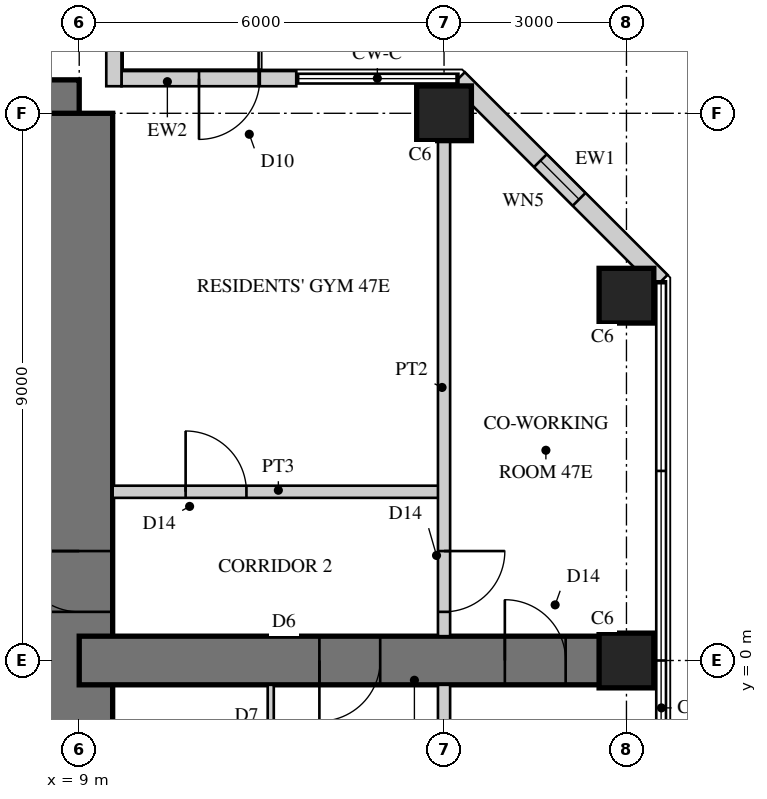
"""IFC4 building model, lengths in metres.
Left out: names, types, materials, properties, quantities, classifications, styles, units other than length and angle.
Written with IfcOpenShell. Run it as: python <this file> out.ifc"""

import sys

from ifc_helpers import new_model, si_unit, direction, frame, frame_2d, origin, origin_2d, place, context, subcontext, project, spatial, rectangle, hollow_rectangle, extrude, element, fill, save


model = new_model("IFC4")
c1 = context("Model", 3, precision=1e-05, world=origin(), true_north=direction((0.0, 1.0)))
c2 = subcontext(c1, "Body", "Model", "MODEL_VIEW")
j1 = project(units=[si_unit("LENGTHUNIT", "METRE"), si_unit("PLANEANGLEUNIT", "RADIAN")], contexts=[c1])
p1 = place(None, origin())
s1 = spatial("IfcSite", under=j1, at=p1, CompositionType="ELEMENT")
p2 = place(p1, origin())
s2 = spatial("IfcBuilding", under=s1, at=p2, CompositionType="ELEMENT")
p3 = place(p2, frame((0.0, 0.0, 189.9)))
s3 = spatial("IfcBuildingStorey", under=s2, at=p3, CompositionType="ELEMENT", Elevation=189.9)
p4 = place(p3, frame((9.0, 9.0, 0.0), z_axis=(0.0, 0.0, 1.0), x_axis=(-1.0, 0.0, 0.0)))
e1 = element("IfcWall", 1, at=p4, inside=s3, PredefinedType="SHEAR", context=c2, shape_type="SweptSolid", body=[
    extrude(rectangle(XDim=18.0, YDim=1.1, at=frame_2d((9.0, 0.0))), origin(), (0.0, 0.0, 1.0), 3.4),
])
p5 = place(p4, frame((9.8, 0.0, 0.0)))
e2 = element("IfcOpeningElement", 2, at=p5, cuts=e1, PredefinedType="OPENING", context=c2, shape_type="SweptSolid", body=[
    extrude(rectangle(XDim=1.0, YDim=2.4, at=frame_2d((0.5, 1.2))), frame((0.0, 0.56, 0.0), z_axis=(0.0, -1.0, 0.0), x_axis=(1.0, 0.0, 0.0)), (0.0, 0.0, 1.0), 1.12),
])
p6 = place(p3, frame((9.0, -9.0, 0.0), z_axis=(0.0, 0.0, 1.0), x_axis=(0.0, 1.0, 0.0)))
e3 = element("IfcWall", 3, at=p6, inside=s3, PredefinedType="SHEAR", context=c2, shape_type="SweptSolid", body=[
    extrude(rectangle(XDim=18.0, YDim=1.1, at=frame_2d((9.0, 0.0))), origin(), (0.0, 0.0, 1.0), 3.4),
])
p7 = place(p6, frame((9.8, 0.0, 0.0)))
e4 = element("IfcOpeningElement", 4, at=p7, cuts=e3, PredefinedType="OPENING", context=c2, shape_type="SweptSolid", body=[
    extrude(rectangle(XDim=1.0, YDim=2.4, at=frame_2d((0.5, 1.2))), frame((0.0, 0.56, 0.0), z_axis=(0.0, -1.0, 0.0), x_axis=(1.0, 0.0, 0.0)), (0.0, 0.0, 1.0), 1.12),
])
p8 = place(p3, frame((9.0, 0.0, 0.0), z_axis=(0.0, 0.0, 1.0), x_axis=(1.0, 0.0, 0.0)))
e5 = element("IfcWall", 5, at=p8, inside=s3, PredefinedType="SHEAR", context=c2, shape_type="SweptSolid", body=[
    extrude(rectangle(XDim=9.0, YDim=0.8, at=frame_2d((4.5, 0.0))), origin(), (0.0, 0.0, 1.0), 3.4),
])
p9 = place(p8, frame((3.95, 0.0, 0.0)))
e6 = element("IfcOpeningElement", 6, at=p9, cuts=e5, PredefinedType="OPENING", context=c2, shape_type="SweptSolid", body=[
    extrude(rectangle(XDim=1.0, YDim=2.15, at=frame_2d((0.5, 1.075))), frame((0.0, 0.41, 0.0), z_axis=(0.0, -1.0, 0.0), x_axis=(1.0, 0.0, 0.0)), (0.0, 0.0, 1.0), 0.82),
])
p10 = place(p8, frame((7.0, 0.0, 0.0)))
e7 = element("IfcOpeningElement", 7, at=p10, cuts=e5, PredefinedType="OPENING", context=c2, shape_type="SweptSolid", body=[
    extrude(rectangle(XDim=1.0, YDim=2.2, at=frame_2d((0.5, 1.1))), frame((0.0, 0.41, 0.0), z_axis=(0.0, -1.0, 0.0), x_axis=(1.0, 0.0, 0.0)), (0.0, 0.0, 1.0), 0.82),
])
for number, where, z_axis, x_axis in (
    (8, (15.0, 9.0, 0.0), (0.0, 0.0, 1.0), (1.0, 0.0, 0.0)),
    (9, (18.0, 0.0, 0.0), (0.0, 0.0, 1.0), (1.0, 0.0, 0.0)),
    (10, (18.0, 6.0, 0.0), (0.0, 0.0, 1.0), (1.0, 0.0, 0.0)),
):
    element("IfcColumn", number, at=place(p3, frame(where, z_axis=z_axis, x_axis=x_axis)), inside=s3, PredefinedType="COLUMN", context=c2, shape_type="SweptSolid", body=[
        extrude(rectangle(XDim=0.9, YDim=0.9, at=origin_2d()), origin(), (0.0, 0.0, 1.0), 3.4),
    ])
p11 = place(p3, frame((18.57, 6.236, 0.0), z_axis=(0.0, 0.0, 1.0), x_axis=(-0.707106781187, 0.707106781187, 0.0)))
e11 = element("IfcWall", 11, at=p11, inside=s3, PredefinedType="SOLIDWALL", context=c2, shape_type="SweptSolid", body=[
    extrude(rectangle(XDim=4.715, YDim=0.3, at=frame_2d((2.357, 0.0))), origin(), (0.0, 0.0, 1.0), 3.22),
])
p12 = place(p11, frame((1.907, 0.0, 0.3)))
e12 = element("IfcOpeningElement", 12, at=p12, cuts=e11, PredefinedType="OPENING", context=c2, shape_type="SweptSolid", body=[
    extrude(rectangle(XDim=0.9, YDim=2.4, at=frame_2d((0.45, 1.2))), frame((0.0, 0.16, 0.0), z_axis=(0.0, -1.0, 0.0), x_axis=(1.0, 0.0, 0.0)), (0.0, 0.0, 1.0), 0.32),
])
p13 = place(p3, frame((12.57, 9.57, 0.0), z_axis=(0.0, 0.0, 1.0), x_axis=(-1.0, 0.0, 0.0)))
e13 = element("IfcWall", 13, at=p13, inside=s3, PredefinedType="SOLIDWALL", context=c2, shape_type="SweptSolid", body=[
    extrude(rectangle(XDim=2.875, YDim=0.25, at=frame_2d((1.438, 0.0))), origin(), (0.0, 0.0, 1.0), 3.22),
])
p14 = place(p13, frame((0.6, 0.0, 0.0)))
e14 = element("IfcOpeningElement", 14, at=p14, cuts=e13, PredefinedType="OPENING", context=c2, shape_type="SweptSolid", body=[
    extrude(rectangle(XDim=1.0, YDim=2.2, at=frame_2d((0.5, 1.1))), frame((0.0, 0.135, 0.0), z_axis=(0.0, -1.0, 0.0), x_axis=(1.0, 0.0, 0.0)), (0.0, 0.0, 1.0), 0.27),
])
p15 = place(p3, frame((9.57, 9.445, 0.0), z_axis=(0.0, 0.0, 1.0), x_axis=(0.0, 1.0, 0.0)))
e15 = element("IfcWall", 15, at=p15, inside=s3, PredefinedType="SOLIDWALL", context=c2, shape_type="SweptSolid", body=[
    extrude(rectangle(XDim=3.125, YDim=0.25, at=frame_2d((1.562, 0.0))), origin(), (0.0, 0.0, 1.0), 3.22),
])
p16 = place(p15, frame((0.6, 0.0, 0.0)))
e16 = element("IfcOpeningElement", 16, at=p16, cuts=e15, PredefinedType="OPENING", context=c2, shape_type="SweptSolid", body=[
    extrude(rectangle(XDim=1.0, YDim=2.2, at=frame_2d((0.5, 1.1))), frame((0.0, 0.135, 0.0), z_axis=(0.0, -1.0, 0.0), x_axis=(1.0, 0.0, 0.0)), (0.0, 0.0, 1.0), 0.27),
])
p17 = place(p3, frame((12.15, -2.6, 0.0), z_axis=(0.0, 0.0, 1.0), x_axis=(0.0, 1.0, 0.0)))
e17 = element("IfcWall", 17, at=p17, inside=s3, PredefinedType="PARTITIONING", context=c2, shape_type="SweptSolid", body=[
    extrude(rectangle(XDim=2.2, YDim=0.1, at=frame_2d((1.1, 0.0))), origin(), (0.0, 0.0, 1.0), 3.22),
])
p18 = place(p17, frame((0.55, 0.0, 0.0)))
e18 = element("IfcOpeningElement", 18, at=p18, cuts=e17, PredefinedType="OPENING", context=c2, shape_type="SweptSolid", body=[
    extrude(rectangle(XDim=0.9, YDim=2.1, at=frame_2d((0.45, 1.05))), frame((0.0, 0.06, 0.0), z_axis=(0.0, -1.0, 0.0), x_axis=(1.0, 0.0, 0.0)), (0.0, 0.0, 1.0), 0.12),
])
p19 = place(p3, frame((9.55, 2.775, 0.0), z_axis=(0.0, 0.0, 1.0), x_axis=(1.0, 0.0, 0.0)))
e19 = element("IfcWall", 19, at=p19, inside=s3, PredefinedType="SOLIDWALL", context=c2, shape_type="SweptSolid", body=[
    extrude(rectangle(XDim=5.45, YDim=0.2, at=frame_2d((2.725, 0.0))), origin(), (0.0, 0.0, 1.0), 3.22),
])
p20 = place(p19, frame((1.2, 0.0, 0.0)))
e20 = element("IfcOpeningElement", 20, at=p20, cuts=e19, PredefinedType="OPENING", context=c2, shape_type="SweptSolid", body=[
    extrude(rectangle(XDim=1.0, YDim=2.2, at=frame_2d((0.5, 1.1))), frame((0.0, 0.11, 0.0), z_axis=(0.0, -1.0, 0.0), x_axis=(1.0, 0.0, 0.0)), (0.0, 0.0, 1.0), 0.22),
])
p21 = place(p3, frame((15.0, -8.55, 0.0), z_axis=(0.0, 0.0, 1.0), x_axis=(0.0, 1.0, 0.0)))
e21 = element("IfcWall", 21, at=p21, inside=s3, PredefinedType="SOLIDWALL", context=c2, shape_type="SweptSolid", body=[
    extrude(rectangle(XDim=8.15, YDim=0.2, at=frame_2d((4.075, 0.0))), origin(), (0.0, 0.0, 1.0), 2.47),
])
p22 = place(p3, frame((15.0, 0.4, 0.0), z_axis=(0.0, 0.0, 1.0), x_axis=(0.0, 1.0, 0.0)))
e22 = element("IfcWall", 22, at=p22, inside=s3, PredefinedType="SOLIDWALL", context=c2, shape_type="SweptSolid", body=[
    extrude(rectangle(XDim=8.15, YDim=0.2, at=frame_2d((4.075, 0.0))), origin(), (0.0, 0.0, 1.0), 2.47),
])
p23 = place(p22, frame((0.4, 0.0, 0.0)))
e23 = element("IfcOpeningElement", 23, at=p23, cuts=e22, PredefinedType="OPENING", context=c2, shape_type="SweptSolid", body=[
    extrude(rectangle(XDim=1.0, YDim=2.2, at=frame_2d((0.5, 1.1))), frame((0.0, 0.11, 0.0), z_axis=(0.0, -1.0, 0.0), x_axis=(1.0, 0.0, 0.0)), (0.0, 0.0, 1.0), 0.22),
])
p24 = place(p12, origin())
e24 = element("IfcWindow", 24, at=p24, inside=s3, PartitioningType="SINGLE_PANEL", PredefinedType="WINDOW", context=c2, shape_type="SweptSolid", body=[
    extrude(hollow_rectangle(XDim=0.9, YDim=2.4, WallThickness=0.06, at=frame_2d((0.45, 1.2))), frame((0.0, 0.03, 0.0), z_axis=(0.0, -1.0, 0.0), x_axis=(1.0, 0.0, 0.0)), (0.0, 0.0, 1.0), 0.06),
    extrude(rectangle(XDim=0.779, YDim=2.279, at=frame_2d((0.45, 1.2))), frame((0.0, 0.03, 0.0), z_axis=(0.0, -1.0, 0.0), x_axis=(1.0, 0.0, 0.0)), (0.0, 0.0, 1.0), 0.06),
])
fill(e12, e24)
p25 = place(p14, origin())
e25 = element("IfcDoor", 25, at=p25, inside=s3, OperationType="SINGLE_SWING_RIGHT", PredefinedType="DOOR", context=c2, shape_type="SweptSolid", body=[
    extrude(hollow_rectangle(XDim=1.0, YDim=2.2, WallThickness=0.06, at=frame_2d((0.5, 1.1))), frame((0.0, 0.025, 0.0), z_axis=(0.0, -1.0, 0.0), x_axis=(1.0, 0.0, 0.0)), (0.0, 0.0, 1.0), 0.05),
    extrude(rectangle(XDim=0.879, YDim=2.079, at=frame_2d((0.5, 1.1))), frame((0.0, 0.025, 0.0), z_axis=(0.0, -1.0, 0.0), x_axis=(1.0, 0.0, 0.0)), (0.0, 0.0, 1.0), 0.05),
])
fill(e14, e25)
p26 = place(p20, origin())
e26 = element("IfcDoor", 26, at=p26, inside=s3, OperationType="SINGLE_SWING_LEFT", PredefinedType="DOOR", context=c2, shape_type="SweptSolid", body=[
    extrude(rectangle(XDim=1.0, YDim=2.2, at=frame_2d((0.5, 1.1))), frame((0.0, 0.025, 0.0), z_axis=(0.0, -1.0, 0.0), x_axis=(1.0, 0.0, 0.0)), (0.0, 0.0, 1.0), 0.05),
])
fill(e20, e26)
p27 = place(p23, frame((1.0, 0.0, 0.0), z_axis=(0.0, 0.0, 1.0), x_axis=(-1.0, 0.0, 0.0)))
e27 = element("IfcDoor", 27, at=p27, inside=s3, OperationType="SINGLE_SWING_LEFT", PredefinedType="DOOR", context=c2, shape_type="SweptSolid", body=[
    extrude(rectangle(XDim=1.0, YDim=2.2, at=frame_2d((0.5, 1.1))), frame((0.0, 0.025, 0.0), z_axis=(0.0, -1.0, 0.0), x_axis=(1.0, 0.0, 0.0)), (0.0, 0.0, 1.0), 0.05),
])
fill(e23, e27)
p28 = place(p9, frame((1.0, 0.0, 0.0), z_axis=(0.0, 0.0, 1.0), x_axis=(-1.0, 0.0, 0.0)))
e28 = element("IfcDoor", 28, at=p28, inside=s3, OperationType="SINGLE_SWING_RIGHT", PredefinedType="DOOR", context=c2, shape_type="SweptSolid", body=[
    extrude(rectangle(XDim=1.0, YDim=2.15, at=frame_2d((0.5, 1.075))), frame((0.0, 0.025, 0.0), z_axis=(0.0, -1.0, 0.0), x_axis=(1.0, 0.0, 0.0)), (0.0, 0.0, 1.0), 0.05),
])
fill(e6, e28)
p29 = place(p10, origin())
e29 = element("IfcDoor", 29, at=p29, inside=s3, OperationType="SINGLE_SWING_LEFT", PredefinedType="DOOR", context=c2, shape_type="SweptSolid", body=[
    extrude(rectangle(XDim=1.0, YDim=2.2, at=frame_2d((0.5, 1.1))), frame((0.0, 0.025, 0.0), z_axis=(0.0, -1.0, 0.0), x_axis=(1.0, 0.0, 0.0)), (0.0, 0.0, 1.0), 0.05),
])
fill(e7, e29)
p30 = place(p7, origin())
e30 = element("IfcDoor", 30, at=p30, inside=s3, OperationType="SINGLE_SWING_RIGHT", PredefinedType="DOOR", context=c2, shape_type="SweptSolid", body=[
    extrude(rectangle(XDim=1.0, YDim=2.4, at=frame_2d((0.5, 1.2))), frame((0.0, 0.055, 0.0), z_axis=(0.0, -1.0, 0.0), x_axis=(1.0, 0.0, 0.0)), (0.0, 0.0, 1.0), 0.05),
])
fill(e4, e30)
save(model, sys.argv[1])
